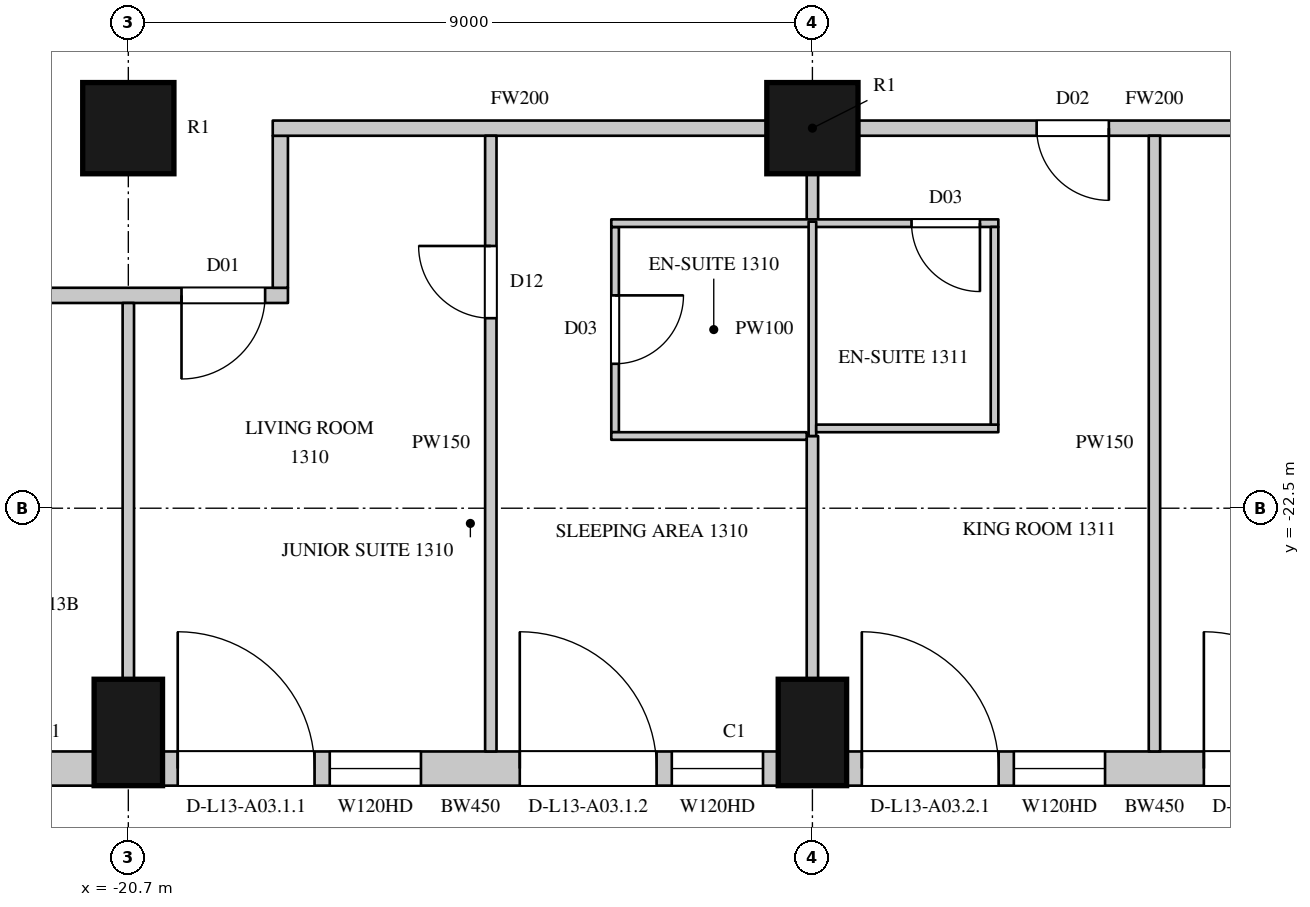
"""IFC4 building model, lengths in metres.
Left out: names, types, materials, properties, quantities, classifications, styles, units other than length and angle.
Written with IfcOpenShell. Run it as: python <this file> out.ifc"""

import sys

from ifc_helpers import new_model, si_unit, direction, frame, frame_2d, origin, origin_2d, place, context, subcontext, project, spatial, rectangle, circle, extrude, element, fill, save


model = new_model("IFC4")
c1 = context("Model", 3, precision=1e-05, world=origin(), true_north=direction((0.0, 1.0)))
c2 = subcontext(c1, "Body", "Model", "MODEL_VIEW")
j1 = project(units=[si_unit("LENGTHUNIT", "METRE"), si_unit("PLANEANGLEUNIT", "RADIAN")], contexts=[c1])
p1 = place(None, origin())
s1 = spatial("IfcSite", under=j1, at=p1, CompositionType="ELEMENT")
p2 = place(p1, origin())
s2 = spatial("IfcBuilding", under=s1, at=p2, CompositionType="ELEMENT")
p3 = place(p2, frame((0.0, 0.0, 77.1)))
s3 = spatial("IfcBuildingStorey", under=s2, at=p3, CompositionType="ELEMENT", Elevation=77.1)
for number, where, z_axis, x_axis in (
    (1, (-20.7, -25.45, 0.0), (0.0, 0.0, 1.0), (1.0, 0.0, 0.0)),
    (2, (-11.7, -25.45, 0.0), (0.0, 0.0, 1.0), (1.0, 0.0, 0.0)),
):
    element("IfcColumn", number, at=place(p3, frame(where, z_axis=z_axis, x_axis=x_axis)), inside=s3, PredefinedType="COLUMN", context=c2, shape_type="SweptSolid", body=[
        extrude(rectangle(XDim=0.9, YDim=1.4, at=origin_2d()), origin(), (0.0, 0.0, 1.0), 3.6),
    ])
for number, where, z_axis, x_axis in (
    (3, (-20.7, -17.5, 0.0), (0.0, 0.0, 1.0), (1.0, 0.0, 0.0)),
    (4, (-11.7, -17.5, 0.0), (0.0, 0.0, 1.0), (1.0, 0.0, 0.0)),
):
    element("IfcColumn", number, at=place(p3, frame(where, z_axis=z_axis, x_axis=x_axis)), inside=s3, PredefinedType="COLUMN", context=c2, shape_type="SweptSolid", body=[
        extrude(circle(Radius=0.6, at=origin_2d()), origin(), (0.0, 0.0, 1.0), 3.6),
    ])
p4 = place(p3, frame((-24.064, -25.925, 0.0), z_axis=(0.0, 0.0, 1.0), x_axis=(1.0, 0.0, 0.0)))
e5 = element("IfcWall", 5, at=p4, inside=s3, PredefinedType="SOLIDWALL", context=c2, shape_type="SweptSolid", body=[
    extrude(rectangle(XDim=2.914, YDim=0.45, at=frame_2d((1.457, 0.0))), origin(), (0.0, 0.0, 1.0), 3.3),
])
p5 = place(p3, frame((-20.25, -25.925, 0.0), z_axis=(0.0, 0.0, 1.0), x_axis=(1.0, 0.0, 0.0)))
e6 = element("IfcWall", 6, at=p5, inside=s3, PredefinedType="SOLIDWALL", context=c2, shape_type="SweptSolid", body=[
    extrude(rectangle(XDim=8.1, YDim=0.45, at=frame_2d((4.05, 0.0))), origin(), (0.0, 0.0, 1.0), 3.3),
])
p6 = place(p5, frame((0.2, 0.0, 0.0)))
e7 = element("IfcOpeningElement", 7, at=p6, cuts=e6, PredefinedType="OPENING", context=c2, shape_type="SweptSolid", body=[
    extrude(rectangle(XDim=1.8, YDim=2.4, at=frame_2d((0.9, 1.2))), frame((0.0, 0.235, 0.0), z_axis=(0.0, -1.0, 0.0), x_axis=(1.0, 0.0, 0.0)), (0.0, 0.0, 1.0), 0.47),
])
p7 = place(p5, frame((2.2, 0.0, 1.05)))
e8 = element("IfcOpeningElement", 8, at=p7, cuts=e6, PredefinedType="OPENING", context=c2, shape_type="SweptSolid", body=[
    extrude(rectangle(XDim=1.2, YDim=2.0, at=frame_2d((0.6, 1.0))), frame((0.0, 0.235, 0.0), z_axis=(0.0, -1.0, 0.0), x_axis=(1.0, 0.0, 0.0)), (0.0, 0.0, 1.0), 0.47),
])
p8 = place(p5, frame((4.7, 0.0, 0.0)))
e9 = element("IfcOpeningElement", 9, at=p8, cuts=e6, PredefinedType="OPENING", context=c2, shape_type="SweptSolid", body=[
    extrude(rectangle(XDim=1.8, YDim=2.4, at=frame_2d((0.9, 1.2))), frame((0.0, 0.235, 0.0), z_axis=(0.0, -1.0, 0.0), x_axis=(1.0, 0.0, 0.0)), (0.0, 0.0, 1.0), 0.47),
])
p9 = place(p5, frame((6.7, 0.0, 1.05)))
e10 = element("IfcOpeningElement", 10, at=p9, cuts=e6, PredefinedType="OPENING", context=c2, shape_type="SweptSolid", body=[
    extrude(rectangle(XDim=1.2, YDim=2.0, at=frame_2d((0.6, 1.0))), frame((0.0, 0.235, 0.0), z_axis=(0.0, -1.0, 0.0), x_axis=(1.0, 0.0, 0.0)), (0.0, 0.0, 1.0), 0.47),
])
p10 = place(p3, frame((-11.25, -25.925, 0.0), z_axis=(0.0, 0.0, 1.0), x_axis=(1.0, 0.0, 0.0)))
e11 = element("IfcWall", 11, at=p10, inside=s3, PredefinedType="SOLIDWALL", context=c2, shape_type="SweptSolid", body=[
    extrude(rectangle(XDim=8.1, YDim=0.45, at=frame_2d((4.05, 0.0))), origin(), (0.0, 0.0, 1.0), 3.3),
])
p11 = place(p10, frame((0.2, 0.0, 0.0)))
e12 = element("IfcOpeningElement", 12, at=p11, cuts=e11, PredefinedType="OPENING", context=c2, shape_type="SweptSolid", body=[
    extrude(rectangle(XDim=1.8, YDim=2.4, at=frame_2d((0.9, 1.2))), frame((0.0, 0.235, 0.0), z_axis=(0.0, -1.0, 0.0), x_axis=(1.0, 0.0, 0.0)), (0.0, 0.0, 1.0), 0.47),
])
p12 = place(p10, frame((2.2, 0.0, 1.05)))
e13 = element("IfcOpeningElement", 13, at=p12, cuts=e11, PredefinedType="OPENING", context=c2, shape_type="SweptSolid", body=[
    extrude(rectangle(XDim=1.2, YDim=2.0, at=frame_2d((0.6, 1.0))), frame((0.0, 0.235, 0.0), z_axis=(0.0, -1.0, 0.0), x_axis=(1.0, 0.0, 0.0)), (0.0, 0.0, 1.0), 0.47),
])
p13 = place(p10, frame((4.7, 0.0, 0.0)))
e14 = element("IfcOpeningElement", 14, at=p13, cuts=e11, PredefinedType="OPENING", context=c2, shape_type="SweptSolid", body=[
    extrude(rectangle(XDim=1.8, YDim=2.4, at=frame_2d((0.9, 1.2))), frame((0.0, 0.235, 0.0), z_axis=(0.0, -1.0, 0.0), x_axis=(1.0, 0.0, 0.0)), (0.0, 0.0, 1.0), 0.47),
])
p14 = place(p10, frame((6.7, 0.0, 1.05)))
e15 = element("IfcOpeningElement", 15, at=p14, cuts=e11, PredefinedType="OPENING", context=c2, shape_type="SweptSolid", body=[
    extrude(rectangle(XDim=1.2, YDim=2.0, at=frame_2d((0.6, 1.0))), frame((0.0, 0.235, 0.0), z_axis=(0.0, -1.0, 0.0), x_axis=(1.0, 0.0, 0.0)), (0.0, 0.0, 1.0), 0.47),
])
p15 = place(p3, frame((-23.7, -19.7, 0.0), z_axis=(0.0, 0.0, 1.0), x_axis=(1.0, 0.0, 0.0)))
e16 = element("IfcWall", 16, at=p15, inside=s3, PredefinedType="PARTITIONING", context=c2, shape_type="SweptSolid", body=[
    extrude(rectangle(XDim=5.1, YDim=0.2, at=frame_2d((2.55, 0.0))), origin(), (0.0, 0.0, 1.0), 3.3),
])
p16 = place(p15, frame((0.8, 0.0, 0.0)))
e17 = element("IfcOpeningElement", 17, at=p16, cuts=e16, PredefinedType="OPENING", context=c2, shape_type="SweptSolid", body=[
    extrude(rectangle(XDim=0.9, YDim=2.2, at=frame_2d((0.45, 1.1))), frame((0.0, 0.11, 0.0), z_axis=(0.0, -1.0, 0.0), x_axis=(1.0, 0.0, 0.0)), (0.0, 0.0, 1.0), 0.22),
])
p17 = place(p15, frame((3.7, 0.0, 0.0)))
e18 = element("IfcOpeningElement", 18, at=p17, cuts=e16, PredefinedType="OPENING", context=c2, shape_type="SweptSolid", body=[
    extrude(rectangle(XDim=1.1, YDim=2.4, at=frame_2d((0.55, 1.2))), frame((0.0, 0.11, 0.0), z_axis=(0.0, -1.0, 0.0), x_axis=(1.0, 0.0, 0.0)), (0.0, 0.0, 1.0), 0.22),
])
p18 = place(p3, frame((-18.7, -19.6, 0.0), z_axis=(0.0, 0.0, 1.0), x_axis=(0.0, 1.0, 0.0)))
e19 = element("IfcWall", 19, at=p18, inside=s3, PredefinedType="PARTITIONING", context=c2, shape_type="SweptSolid", body=[
    extrude(rectangle(XDim=2.0, YDim=0.2, at=frame_2d((1.0, 0.0))), origin(), (0.0, 0.0, 1.0), 3.3),
])
p19 = place(p3, frame((-18.8, -17.5, 0.0), z_axis=(0.0, 0.0, 1.0), x_axis=(1.0, 0.0, 0.0)))
e20 = element("IfcWall", 20, at=p19, inside=s3, PredefinedType="PARTITIONING", context=c2, shape_type="SweptSolid", body=[
    extrude(rectangle(XDim=6.5, YDim=0.2, at=frame_2d((3.25, 0.0))), origin(), (0.0, 0.0, 1.0), 2.75),
])
p20 = place(p3, frame((-11.1, -17.5, 0.0), z_axis=(0.0, 0.0, 1.0), x_axis=(1.0, 0.0, 0.0)))
e21 = element("IfcWall", 21, at=p20, inside=s3, PredefinedType="PARTITIONING", context=c2, shape_type="SweptSolid", body=[
    extrude(rectangle(XDim=7.8, YDim=0.2, at=frame_2d((3.9, 0.0))), origin(), (0.0, 0.0, 1.0), 2.75),
])
p21 = place(p20, frame((2.35, 0.0, 0.0)))
e22 = element("IfcOpeningElement", 22, at=p21, cuts=e21, PredefinedType="OPENING", context=c2, shape_type="SweptSolid", body=[
    extrude(rectangle(XDim=0.95, YDim=2.2, at=frame_2d((0.475, 1.1))), frame((0.0, 0.11, 0.0), z_axis=(0.0, -1.0, 0.0), x_axis=(1.0, 0.0, 0.0)), (0.0, 0.0, 1.0), 0.22),
])
p22 = place(p20, frame((5.15, 0.0, 0.0)))
e23 = element("IfcOpeningElement", 23, at=p22, cuts=e21, PredefinedType="OPENING", context=c2, shape_type="SweptSolid", body=[
    extrude(rectangle(XDim=1.1, YDim=2.4, at=frame_2d((0.55, 1.2))), frame((0.0, 0.11, 0.0), z_axis=(0.0, -1.0, 0.0), x_axis=(1.0, 0.0, 0.0)), (0.0, 0.0, 1.0), 0.22),
])
p23 = place(p3, frame((-20.7, -24.75, 0.0), z_axis=(0.0, 0.0, 1.0), x_axis=(0.0, 1.0, 0.0)))
e24 = element("IfcWall", 24, at=p23, inside=s3, PredefinedType="PARTITIONING", context=c2, shape_type="SweptSolid", body=[
    extrude(rectangle(XDim=4.95, YDim=0.15, at=frame_2d((2.475, 0.0))), origin(), (0.0, 0.0, 1.0), 2.75),
])
p24 = place(p3, frame((-15.931, -25.7, 0.0), z_axis=(0.0, 0.0, 1.0), x_axis=(0.0, 1.0, 0.0)))
e25 = element("IfcWall", 25, at=p24, inside=s3, PredefinedType="PARTITIONING", context=c2, shape_type="SweptSolid", body=[
    extrude(rectangle(XDim=8.1, YDim=0.15, at=frame_2d((4.05, 0.0))), origin(), (0.0, 0.0, 1.0), 3.3),
])
p25 = place(p24, frame((5.7, 0.0, 0.0)))
e26 = element("IfcOpeningElement", 26, at=p25, cuts=e25, PredefinedType="OPENING", context=c2, shape_type="SweptSolid", body=[
    extrude(rectangle(XDim=0.95, YDim=2.2, at=frame_2d((0.475, 1.1))), frame((0.0, 0.085, 0.0), z_axis=(0.0, -1.0, 0.0), x_axis=(1.0, 0.0, 0.0)), (0.0, 0.0, 1.0), 0.17),
])
p26 = place(p3, frame((-11.7, -24.75, 0.0), z_axis=(0.0, 0.0, 1.0), x_axis=(0.0, 1.0, 0.0)))
e27 = element("IfcWall", 27, at=p26, inside=s3, PredefinedType="PARTITIONING", context=c2, shape_type="SweptSolid", body=[
    extrude(rectangle(XDim=3.2, YDim=0.15, at=frame_2d((1.6, 0.0))), origin(), (0.0, 0.0, 1.0), 2.75),
])
p27 = place(p3, frame((-11.7, -18.73, 0.0), z_axis=(0.0, 0.0, 1.0), x_axis=(0.0, 1.0, 0.0)))
e28 = element("IfcWall", 28, at=p27, inside=s3, PredefinedType="PARTITIONING", context=c2, shape_type="SweptSolid", body=[
    extrude(rectangle(XDim=0.63, YDim=0.15, at=frame_2d((0.315, 0.0))), origin(), (0.0, 0.0, 1.0), 2.75),
])
p28 = place(p3, frame((-7.2, -25.7, 0.0), z_axis=(0.0, 0.0, 1.0), x_axis=(0.0, 1.0, 0.0)))
e29 = element("IfcWall", 29, at=p28, inside=s3, PredefinedType="PARTITIONING", context=c2, shape_type="SweptSolid", body=[
    extrude(rectangle(XDim=8.1, YDim=0.15, at=frame_2d((4.05, 0.0))), origin(), (0.0, 0.0, 1.0), 2.65),
])
p29 = place(p3, frame((-14.296, -21.5, 0.0), z_axis=(0.0, 0.0, 1.0), x_axis=(0.0, 1.0, 0.0)))
e30 = element("IfcWall", 30, at=p29, inside=s3, PredefinedType="PARTITIONING", context=c2, shape_type="SweptSolid", body=[
    extrude(rectangle(XDim=2.7, YDim=0.1, at=frame_2d((1.35, 0.0))), origin(), (0.0, 0.0, 1.0), 3.3),
])
p30 = place(p29, frame((0.9, 0.0, 0.0)))
e31 = element("IfcOpeningElement", 31, at=p30, cuts=e30, PredefinedType="OPENING", context=c2, shape_type="SweptSolid", body=[
    extrude(rectangle(XDim=0.9, YDim=2.2, at=frame_2d((0.45, 1.1))), frame((0.0, 0.06, 0.0), z_axis=(0.0, -1.0, 0.0), x_axis=(1.0, 0.0, 0.0)), (0.0, 0.0, 1.0), 0.12),
])
p31 = place(p3, frame((-14.346, -21.55, 0.0), z_axis=(0.0, 0.0, 1.0), x_axis=(1.0, 0.0, 0.0)))
e32 = element("IfcWall", 32, at=p31, inside=s3, PredefinedType="PARTITIONING", context=c2, shape_type="SweptSolid", body=[
    extrude(rectangle(XDim=2.571, YDim=0.1, at=frame_2d((1.286, 0.0))), origin(), (0.0, 0.0, 1.0), 3.3),
])
p32 = place(p3, frame((-14.346, -18.75, 0.0), z_axis=(0.0, 0.0, 1.0), x_axis=(1.0, 0.0, 0.0)))
e33 = element("IfcWall", 33, at=p32, inside=s3, PredefinedType="PARTITIONING", context=c2, shape_type="SweptSolid", body=[
    extrude(rectangle(XDim=5.092, YDim=0.1, at=frame_2d((2.546, 0.0))), origin(), (0.0, 0.0, 1.0), 3.3),
])
p33 = place(p32, frame((3.95, 0.0, 0.0)))
e34 = element("IfcOpeningElement", 34, at=p33, cuts=e33, PredefinedType="OPENING", context=c2, shape_type="SweptSolid", body=[
    extrude(rectangle(XDim=0.9, YDim=2.2, at=frame_2d((0.45, 1.1))), frame((0.0, 0.06, 0.0), z_axis=(0.0, -1.0, 0.0), x_axis=(1.0, 0.0, 0.0)), (0.0, 0.0, 1.0), 0.12),
])
p34 = place(p3, frame((-11.7, -21.55, 0.0), z_axis=(0.0, 0.0, 1.0), x_axis=(0.0, 1.0, 0.0)))
e35 = element("IfcWall", 35, at=p34, inside=s3, PredefinedType="PARTITIONING", context=c2, shape_type="SweptSolid", body=[
    extrude(rectangle(XDim=2.82, YDim=0.1, at=frame_2d((1.41, 0.0))), origin(), (0.0, 0.0, 1.0), 2.75),
])
p35 = place(p3, frame((-11.65, -21.45, 0.0), z_axis=(0.0, 0.0, 1.0), x_axis=(1.0, 0.0, 0.0)))
e36 = element("IfcWall", 36, at=p35, inside=s3, PredefinedType="PARTITIONING", context=c2, shape_type="SweptSolid", body=[
    extrude(rectangle(XDim=2.396, YDim=0.1, at=frame_2d((1.198, 0.0))), origin(), (0.0, 0.0, 1.0), 3.3),
])
p36 = place(p3, frame((-9.304, -21.4, 0.0), z_axis=(0.0, 0.0, 1.0), x_axis=(0.0, 1.0, 0.0)))
e37 = element("IfcWall", 37, at=p36, inside=s3, PredefinedType="PARTITIONING", context=c2, shape_type="SweptSolid", body=[
    extrude(rectangle(XDim=2.6, YDim=0.1, at=frame_2d((1.3, 0.0))), origin(), (0.0, 0.0, 1.0), 3.3),
])
p37 = place(p6, origin())
e38 = element("IfcDoor", 38, at=p37, inside=s3, OperationType="SLIDING_TO_LEFT", PredefinedType="DOOR", context=c2, shape_type="SweptSolid", body=[
    extrude(rectangle(XDim=1.8, YDim=2.4, at=frame_2d((0.9, 1.2))), frame((0.0, 0.13, 0.0), z_axis=(0.0, -1.0, 0.0), x_axis=(1.0, 0.0, 0.0)), (0.0, 0.0, 1.0), 0.05),
])
fill(e7, e38)
p38 = place(p7, origin())
e39 = element("IfcWindow", 39, at=p38, inside=s3, PartitioningType="SINGLE_PANEL", PredefinedType="WINDOW", context=c2, shape_type="SweptSolid", body=[
    extrude(rectangle(XDim=1.2, YDim=2.0, at=frame_2d((0.6, 1.0))), frame((0.0, 0.135, 0.0), z_axis=(0.0, -1.0, 0.0), x_axis=(1.0, 0.0, 0.0)), (0.0, 0.0, 1.0), 0.06),
])
fill(e8, e39)
p39 = place(p8, origin())
e40 = element("IfcDoor", 40, at=p39, inside=s3, OperationType="SLIDING_TO_LEFT", PredefinedType="DOOR", context=c2, shape_type="SweptSolid", body=[
    extrude(rectangle(XDim=1.8, YDim=2.4, at=frame_2d((0.9, 1.2))), frame((0.0, 0.13, 0.0), z_axis=(0.0, -1.0, 0.0), x_axis=(1.0, 0.0, 0.0)), (0.0, 0.0, 1.0), 0.05),
])
fill(e9, e40)
p40 = place(p9, origin())
e41 = element("IfcWindow", 41, at=p40, inside=s3, PartitioningType="SINGLE_PANEL", PredefinedType="WINDOW", context=c2, shape_type="SweptSolid", body=[
    extrude(rectangle(XDim=1.2, YDim=2.0, at=frame_2d((0.6, 1.0))), frame((0.0, 0.135, 0.0), z_axis=(0.0, -1.0, 0.0), x_axis=(1.0, 0.0, 0.0)), (0.0, 0.0, 1.0), 0.06),
])
fill(e10, e41)
p41 = place(p11, origin())
e42 = element("IfcDoor", 42, at=p41, inside=s3, OperationType="SLIDING_TO_LEFT", PredefinedType="DOOR", context=c2, shape_type="SweptSolid", body=[
    extrude(rectangle(XDim=1.8, YDim=2.4, at=frame_2d((0.9, 1.2))), frame((0.0, 0.13, 0.0), z_axis=(0.0, -1.0, 0.0), x_axis=(1.0, 0.0, 0.0)), (0.0, 0.0, 1.0), 0.05),
])
fill(e12, e42)
p42 = place(p12, origin())
e43 = element("IfcWindow", 43, at=p42, inside=s3, PartitioningType="SINGLE_PANEL", PredefinedType="WINDOW", context=c2, shape_type="SweptSolid", body=[
    extrude(rectangle(XDim=1.2, YDim=2.0, at=frame_2d((0.6, 1.0))), frame((0.0, 0.135, 0.0), z_axis=(0.0, -1.0, 0.0), x_axis=(1.0, 0.0, 0.0)), (0.0, 0.0, 1.0), 0.06),
])
fill(e13, e43)
p43 = place(p13, origin())
e44 = element("IfcDoor", 44, at=p43, inside=s3, OperationType="SLIDING_TO_LEFT", PredefinedType="DOOR", context=c2, shape_type="SweptSolid", body=[
    extrude(rectangle(XDim=1.8, YDim=2.4, at=frame_2d((0.9, 1.2))), frame((0.0, 0.13, 0.0), z_axis=(0.0, -1.0, 0.0), x_axis=(1.0, 0.0, 0.0)), (0.0, 0.0, 1.0), 0.05),
])
fill(e14, e44)
p44 = place(p17, origin())
e45 = element("IfcDoor", 45, at=p44, inside=s3, OperationType="SINGLE_SWING_RIGHT", PredefinedType="DOOR", context=c2, shape_type="SweptSolid", body=[
    extrude(rectangle(XDim=1.1, YDim=2.4, at=frame_2d((0.55, 1.2))), frame((0.0, 0.025, 0.0), z_axis=(0.0, -1.0, 0.0), x_axis=(1.0, 0.0, 0.0)), (0.0, 0.0, 1.0), 0.05),
])
fill(e18, e45)
p45 = place(p25, origin())
e46 = element("IfcDoor", 46, at=p45, inside=s3, OperationType="SINGLE_SWING_RIGHT", PredefinedType="DOOR", context=c2, shape_type="SweptSolid", body=[
    extrude(rectangle(XDim=0.95, YDim=2.2, at=frame_2d((0.475, 1.1))), frame((0.0, 0.025, 0.0), z_axis=(0.0, -1.0, 0.0), x_axis=(1.0, 0.0, 0.0)), (0.0, 0.0, 1.0), 0.05),
])
fill(e26, e46)
p46 = place(p30, origin())
e47 = element("IfcDoor", 47, at=p46, inside=s3, OperationType="SINGLE_SWING_LEFT", PredefinedType="DOOR", context=c2, shape_type="SweptSolid", body=[
    extrude(rectangle(XDim=0.9, YDim=2.2, at=frame_2d((0.45, 1.1))), frame((0.0, 0.025, 0.0), z_axis=(0.0, -1.0, 0.0), x_axis=(1.0, 0.0, 0.0)), (0.0, 0.0, 1.0), 0.05),
])
fill(e31, e47)
p47 = place(p21, origin())
e48 = element("IfcDoor", 48, at=p47, inside=s3, OperationType="SINGLE_SWING_LEFT", PredefinedType="DOOR", context=c2, shape_type="SweptSolid", body=[
    extrude(rectangle(XDim=0.95, YDim=2.2, at=frame_2d((0.475, 1.1))), frame((0.0, 0.025, 0.0), z_axis=(0.0, -1.0, 0.0), x_axis=(1.0, 0.0, 0.0)), (0.0, 0.0, 1.0), 0.05),
])
fill(e22, e48)
p48 = place(p33, origin())
e49 = element("IfcDoor", 49, at=p48, inside=s3, OperationType="SINGLE_SWING_LEFT", PredefinedType="DOOR", context=c2, shape_type="SweptSolid", body=[
    extrude(rectangle(XDim=0.9, YDim=2.2, at=frame_2d((0.45, 1.1))), frame((0.0, 0.025, 0.0), z_axis=(0.0, -1.0, 0.0), x_axis=(1.0, 0.0, 0.0)), (0.0, 0.0, 1.0), 0.05),
])
fill(e34, e49)
save(model, sys.argv[1])
